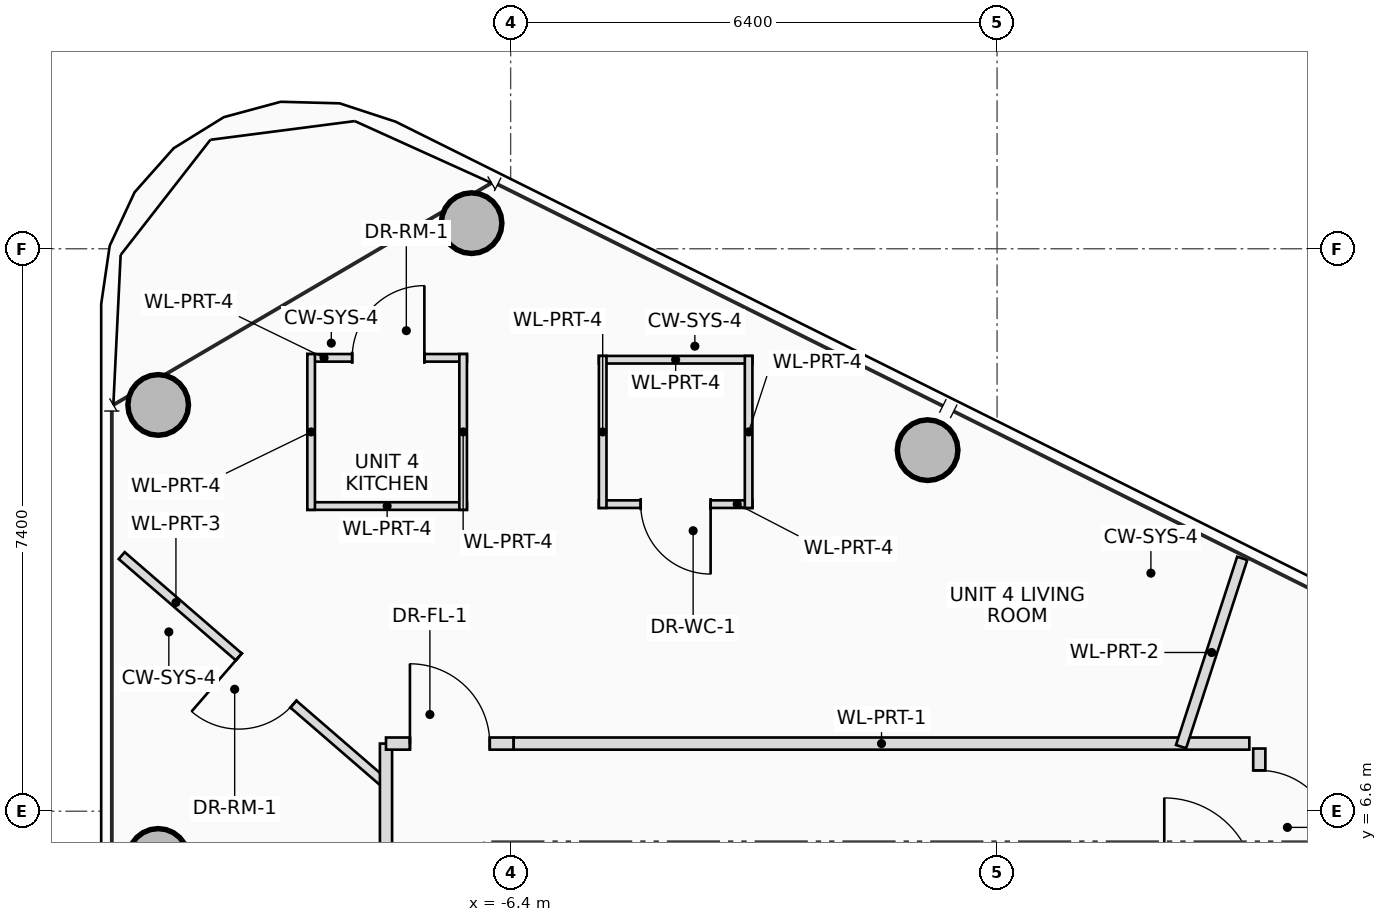
"""IFC4 building model, lengths in metres.
Left out: names, types, materials, properties, quantities, classifications, styles, units other than length and angle.
Written with IfcOpenShell. Run it as: python <this file> out.ifc"""

import sys

from ifc_helpers import new_model, si_unit, direction, frame, frame_2d, origin, origin_2d, place, context, subcontext, project, spatial, rectangle, hollow_circle, extrude, source, transform, mapped, element, fill, save


model = new_model("IFC4")
c1 = context("Model", 3, precision=1e-05, world=origin(), true_north=direction((0.0, 1.0)))
c2 = subcontext(c1, "Body", "Model", "MODEL_VIEW")
j1 = project(units=[si_unit("LENGTHUNIT", "METRE"), si_unit("PLANEANGLEUNIT", "RADIAN")], contexts=[c1])
p1 = place(None, origin())
s1 = spatial("IfcSite", under=j1, at=p1, CompositionType="ELEMENT")
p2 = place(p1, origin())
s2 = spatial("IfcBuilding", under=s1, at=p2, CompositionType="ELEMENT")
p3 = place(p2, frame((0.0, 0.0, 307.1)))
s3 = spatial("IfcBuildingStorey", under=s2, at=p3, CompositionType="ELEMENT", Elevation=307.1)
m1 = source(origin(), c2, "Body", "SweptSolid", [
    extrude(hollow_circle(Radius=0.4, WallThickness=0.028, at=origin_2d()), origin(), (0.0, 0.0, 1.0), 3.45),
])
for number, where, z_axis, x_axis in (
    (1, (-0.914, 11.35, 0.0), (0.0, 0.0, 1.0), (1.0, 0.0, 0.0)),
    (2, (-6.914, 14.337, 0.0), (0.0, 0.0, 1.0), (1.0, 0.0, 0.0)),
    (3, (-11.037, 11.945, 0.0), (0.0, 0.0, 1.0), (1.0, 0.0, 0.0)),
    (4, (-11.037, 5.973, 0.0), (0.0, 0.0, 1.0), (1.0, 0.0, 0.0)),
):
    element("IfcColumn", number, at=place(p3, frame(where, z_axis=z_axis, x_axis=x_axis)), inside=s3, PredefinedType="COLUMN", context=c2, shape_type="MappedRepresentation", body=[
        mapped(m1, transform((0.0, 0.0, 0.0), scale=1.0)),
    ])
p4 = place(p3, frame((-8.07, 6.981, 0.0), z_axis=(0.0, 0.0, 1.0), x_axis=(-0.756280799409, 0.654247164644, 0.0)))
e5 = element("IfcWall", 5, at=p4, inside=s3, PredefinedType="PARTITIONING", context=c2, shape_type="SweptSolid", body=[
    extrude(rectangle(XDim=4.558, YDim=0.12, at=frame_2d((2.279, 0.0))), origin(), (0.0, 0.0, 1.0), 2.815),
])
p5 = place(p4, frame((1.571, 0.0, 0.0)))
e6 = element("IfcOpeningElement", 6, at=p5, cuts=e5, PredefinedType="OPENING", context=c2, shape_type="SweptSolid", body=[
    extrude(rectangle(XDim=0.95, YDim=2.1, at=frame_2d((0.475, 1.05))), frame((0.0, 0.07, 0.0), z_axis=(0.0, -1.0, 0.0), x_axis=(1.0, 0.0, 0.0)), (0.0, 0.0, 1.0), 0.14),
])
p6 = place(p3, frame((-5.239, 12.54, 0.0), z_axis=(0.0, 0.0, 1.0), x_axis=(1.0, 0.0, 0.0)))
e7 = element("IfcWall", 7, at=p6, inside=s3, PredefinedType="PARTITIONING", context=c2, shape_type="SweptSolid", body=[
    extrude(rectangle(XDim=2.02, YDim=0.1, at=frame_2d((1.01, 0.0))), origin(), (0.0, 0.0, 1.0), 2.815),
])
p7 = place(p3, frame((-3.219, 10.64, 0.0), z_axis=(0.0, 0.0, 1.0), x_axis=(-1.0, 0.0, 0.0)))
e8 = element("IfcWall", 8, at=p7, inside=s3, PredefinedType="PARTITIONING", context=c2, shape_type="SweptSolid", body=[
    extrude(rectangle(XDim=2.02, YDim=0.1, at=frame_2d((1.01, 0.0))), origin(), (0.0, 0.0, 1.0), 2.905),
])
p8 = place(p7, frame((0.55, 0.0, 0.0)))
e9 = element("IfcOpeningElement", 9, at=p8, cuts=e8, PredefinedType="OPENING", context=c2, shape_type="SweptSolid", body=[
    extrude(rectangle(XDim=0.92, YDim=2.1, at=frame_2d((0.46, 1.05))), frame((0.0, 0.06, 0.0), z_axis=(0.0, -1.0, 0.0), x_axis=(1.0, 0.0, 0.0)), (0.0, 0.0, 1.0), 0.12),
])
p9 = place(p3, frame((-3.269, 12.59, 0.0), z_axis=(0.0, 0.0, 1.0), x_axis=(0.0, -1.0, 0.0)))
e10 = element("IfcWall", 10, at=p9, inside=s3, PredefinedType="PARTITIONING", context=c2, shape_type="SweptSolid", body=[
    extrude(rectangle(XDim=2.0, YDim=0.1, at=frame_2d((1.0, 0.0))), origin(), (0.0, 0.0, 1.0), 2.815),
])
p10 = place(p3, frame((-5.189, 10.59, 0.0), z_axis=(0.0, 0.0, 1.0), x_axis=(0.0, 1.0, 0.0)))
e11 = element("IfcWall", 11, at=p10, inside=s3, PredefinedType="PARTITIONING", context=c2, shape_type="SweptSolid", body=[
    extrude(rectangle(XDim=2.0, YDim=0.1, at=frame_2d((1.0, 0.0))), origin(), (0.0, 0.0, 1.0), 2.905),
])
p11 = place(p3, frame((-9.075, 12.565, 0.0), z_axis=(0.0, 0.0, 1.0), x_axis=(1.0, 0.0, 0.0)))
e12 = element("IfcWall", 12, at=p11, inside=s3, PredefinedType="PARTITIONING", context=c2, shape_type="SweptSolid", body=[
    extrude(rectangle(XDim=2.1, YDim=0.1, at=frame_2d((1.05, 0.0))), origin(), (0.0, 0.0, 1.0), 3.25),
])
p12 = place(p11, frame((0.59, 0.0, 0.0)))
e13 = element("IfcOpeningElement", 13, at=p12, cuts=e12, PredefinedType="OPENING", context=c2, shape_type="SweptSolid", body=[
    extrude(rectangle(XDim=0.95, YDim=2.1, at=frame_2d((0.475, 1.05))), frame((0.0, 0.06, 0.0), z_axis=(0.0, -1.0, 0.0), x_axis=(1.0, 0.0, 0.0)), (0.0, 0.0, 1.0), 0.12),
])
p13 = place(p3, frame((-6.975, 10.615, 0.0), z_axis=(0.0, 0.0, 1.0), x_axis=(-1.0, 0.0, 0.0)))
e14 = element("IfcWall", 14, at=p13, inside=s3, PredefinedType="PARTITIONING", context=c2, shape_type="SweptSolid", body=[
    extrude(rectangle(XDim=2.1, YDim=0.1, at=frame_2d((1.05, 0.0))), origin(), (0.0, 0.0, 1.0), 2.905),
])
p14 = place(p3, frame((-7.025, 12.615, 0.0), z_axis=(0.0, 0.0, 1.0), x_axis=(0.0, -1.0, 0.0)))
e15 = element("IfcWall", 15, at=p14, inside=s3, PredefinedType="PARTITIONING", context=c2, shape_type="SweptSolid", body=[
    extrude(rectangle(XDim=2.05, YDim=0.1, at=frame_2d((1.025, 0.0))), origin(), (0.0, 0.0, 1.0), 2.905),
])
p15 = place(p3, frame((-9.025, 10.565, 0.0), z_axis=(0.0, 0.0, 1.0), x_axis=(0.0, 1.0, 0.0)))
e16 = element("IfcWall", 16, at=p15, inside=s3, PredefinedType="PARTITIONING", context=c2, shape_type="SweptSolid", body=[
    extrude(rectangle(XDim=2.05, YDim=0.1, at=frame_2d((1.025, 0.0))), origin(), (0.0, 0.0, 1.0), 3.25),
])
p16 = place(p3, frame((-8.04, 5.85, 0.0), z_axis=(0.0, 0.0, 1.0), x_axis=(0.0, 1.0, 0.0)))
e17 = element("IfcWall", 17, at=p16, inside=s3, PredefinedType="PARTITIONING", context=c2, shape_type="SweptSolid", body=[
    extrude(rectangle(XDim=1.64, YDim=0.16, at=frame_2d((0.82, 0.0))), origin(), (0.0, 0.0, 1.0), 2.905),
])
p17 = place(p3, frame((-8.04, 7.49, 0.0), z_axis=(0.0, 0.0, 1.0), x_axis=(1.0, 0.0, 0.0)))
e18 = element("IfcWall", 18, at=p17, inside=s3, PredefinedType="PARTITIONING", context=c2, shape_type="SweptSolid", body=[
    extrude(rectangle(XDim=1.68, YDim=0.16, at=frame_2d((0.84, 0.0))), origin(), (0.0, 0.0, 1.0), 2.655),
])
p18 = place(p17, frame((0.315, 0.0, 0.0)))
e19 = element("IfcOpeningElement", 19, at=p18, cuts=e18, PredefinedType="OPENING", context=c2, shape_type="SweptSolid", body=[
    extrude(rectangle(XDim=1.05, YDim=2.2, at=frame_2d((0.525, 1.1))), frame((0.0, 0.09, 0.0), z_axis=(0.0, -1.0, 0.0), x_axis=(1.0, 0.0, 0.0)), (0.0, 0.0, 1.0), 0.18),
])
p19 = place(p3, frame((-6.36, 7.49, 0.0), z_axis=(0.0, 0.0, 1.0), x_axis=(1.0, 0.0, 0.0)))
e20 = element("IfcWall", 20, at=p19, inside=s3, PredefinedType="PARTITIONING", context=c2, shape_type="SweptSolid", body=[
    extrude(rectangle(XDim=9.679, YDim=0.16, at=frame_2d((4.84, 0.0))), origin(), (0.0, 0.0, 1.0), 2.655),
])
p20 = place(p3, frame((3.45, 7.425, 0.0), z_axis=(0.0, 0.0, 1.0), x_axis=(0.0, -1.0, 0.0)))
e21 = element("IfcWall", 21, at=p20, inside=s3, PredefinedType="PARTITIONING", context=c2, shape_type="SweptSolid", body=[
    extrude(rectangle(XDim=1.575, YDim=0.16, at=frame_2d((0.787, 0.0))), origin(), (0.0, 0.0, 1.0), 2.855),
])
p21 = place(p20, frame((0.287, 0.0, 0.0)))
e22 = element("IfcOpeningElement", 22, at=p21, cuts=e21, PredefinedType="OPENING", context=c2, shape_type="SweptSolid", body=[
    extrude(rectangle(XDim=1.0, YDim=2.25, at=frame_2d((0.5, 1.125))), frame((0.0, 0.09, 0.0), z_axis=(0.0, -1.0, 0.0), x_axis=(1.0, 0.0, 0.0)), (0.0, 0.0, 1.0), 0.18),
])
p22 = place(p3, frame((2.421, 7.45, 0.0), z_axis=(0.0, 0.0, 1.0), x_axis=(0.309047920595, 0.951046467201, 0.0)))
e23 = element("IfcWall", 23, at=p22, inside=s3, PredefinedType="PARTITIONING", context=c2, shape_type="SweptSolid", body=[
    extrude(rectangle(XDim=2.604, YDim=0.14, at=frame_2d((1.302, 0.0))), origin(), (0.0, 0.0, 1.0), 2.815),
])
p23 = place(p5, origin())
e24 = element("IfcDoor", 24, at=p23, inside=s3, OperationType="SINGLE_SWING_RIGHT", PredefinedType="DOOR", context=c2, shape_type="SweptSolid", body=[
    extrude(rectangle(XDim=0.95, YDim=2.1, at=frame_2d((0.475, 1.05))), frame((0.0, 0.025, 0.0), z_axis=(0.0, -1.0, 0.0), x_axis=(1.0, 0.0, 0.0)), (0.0, 0.0, 1.0), 0.05),
])
fill(e6, e24)
p24 = place(p8, origin())
e25 = element("IfcDoor", 25, at=p24, inside=s3, OperationType="SINGLE_SWING_LEFT", PredefinedType="DOOR", context=c2, shape_type="SweptSolid", body=[
    extrude(rectangle(XDim=0.92, YDim=2.1, at=frame_2d((0.46, 1.05))), frame((0.0, 0.025, 0.0), z_axis=(0.0, -1.0, 0.0), x_axis=(1.0, 0.0, 0.0)), (0.0, 0.0, 1.0), 0.05),
])
fill(e9, e25)
p25 = place(p12, origin())
e26 = element("IfcDoor", 26, at=p25, inside=s3, OperationType="SINGLE_SWING_RIGHT", PredefinedType="DOOR", context=c2, shape_type="SweptSolid", body=[
    extrude(rectangle(XDim=0.95, YDim=2.1, at=frame_2d((0.475, 1.05))), frame((0.0, 0.025, 0.0), z_axis=(0.0, -1.0, 0.0), x_axis=(1.0, 0.0, 0.0)), (0.0, 0.0, 1.0), 0.05),
])
fill(e13, e26)
p26 = place(p18, origin())
e27 = element("IfcDoor", 27, at=p26, inside=s3, OperationType="SINGLE_SWING_LEFT", PredefinedType="DOOR", context=c2, shape_type="SweptSolid", body=[
    extrude(rectangle(XDim=1.05, YDim=2.2, at=frame_2d((0.525, 1.1))), frame((0.0, 0.025, 0.0), z_axis=(0.0, -1.0, 0.0), x_axis=(1.0, 0.0, 0.0)), (0.0, 0.0, 1.0), 0.05),
])
fill(e19, e27)
p27 = place(p21, origin())
e28 = element("IfcDoor", 28, at=p27, inside=s3, OperationType="SINGLE_SWING_RIGHT", PredefinedType="DOOR", context=c2, shape_type="SweptSolid", body=[
    extrude(rectangle(XDim=1.0, YDim=2.25, at=frame_2d((0.5, 1.125))), frame((0.0, 0.025, 0.0), z_axis=(0.0, -1.0, 0.0), x_axis=(1.0, 0.0, 0.0)), (0.0, 0.0, 1.0), 0.05),
])
fill(e22, e28)
save(model, sys.argv[1])
